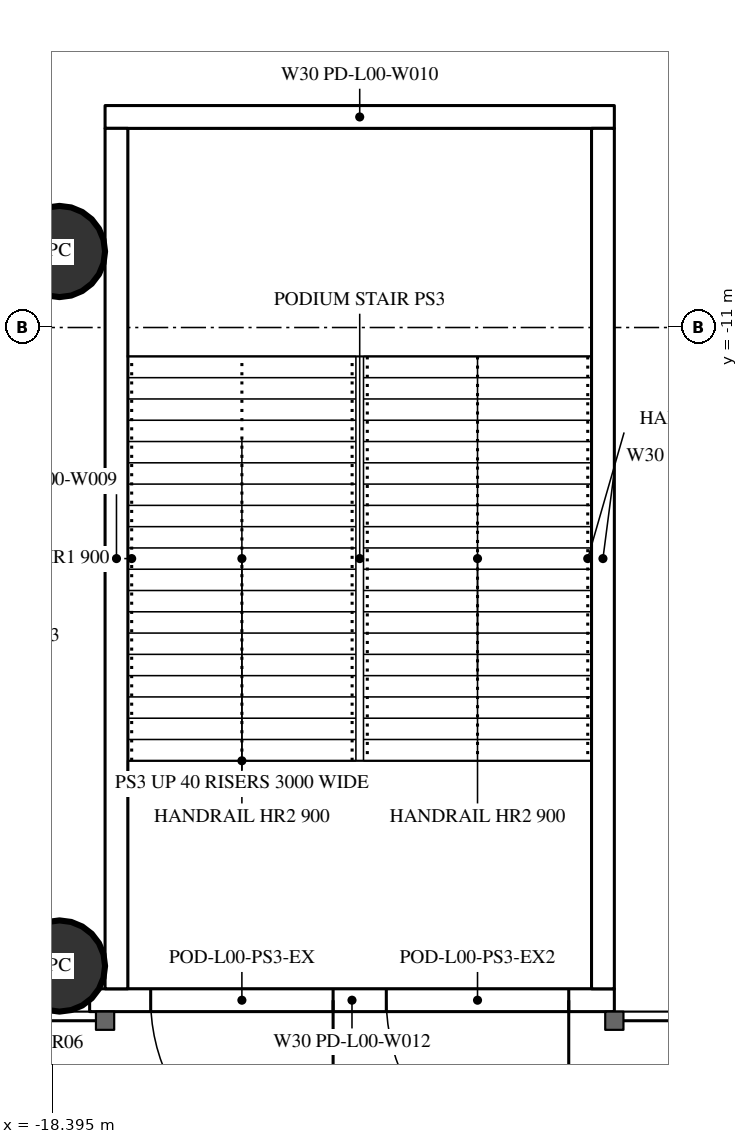
"""IFC4 building model, lengths in metres.
Left out: names, types, materials, properties, quantities, classifications, styles, units other than length and angle.
Written with IfcOpenShell. Run it as: python <this file> out.ifc"""

import sys

from ifc_helpers import new_model, si_unit, direction, frame, frame_2d, origin, origin_2d, place, context, subcontext, project, spatial, rectangle, circle, extrude, element, fill, save


model = new_model("IFC4")
c1 = context("Model", 3, precision=1e-05, world=origin(), true_north=direction((0.0, 1.0)))
c2 = subcontext(c1, "Body", "Model", "MODEL_VIEW")
j1 = project(units=[si_unit("LENGTHUNIT", "METRE"), si_unit("PLANEANGLEUNIT", "RADIAN")], contexts=[c1])
p1 = place(None, origin())
s1 = spatial("IfcSite", under=j1, at=p1, CompositionType="ELEMENT")
p2 = place(p1, origin())
s2 = spatial("IfcBuilding", under=s1, at=p2, CompositionType="ELEMENT")
p3 = place(p2, origin())
s3 = spatial("IfcBuildingStorey", under=s2, at=p3, CompositionType="ELEMENT", Elevation=0.0)
for number, where, z_axis, x_axis in (
    (1, (-18.3, -19.4, 0.0), (0.0, 0.0, 1.0), (1.0, 0.0, 0.0)),
    (2, (-18.3, -10.0, 0.0), (0.0, 0.0, 1.0), (1.0, 0.0, 0.0)),
):
    element("IfcColumn", number, at=place(p3, frame(where, z_axis=z_axis, x_axis=x_axis)), inside=s3, PredefinedType="COLUMN", context=c2, shape_type="SweptSolid", body=[
        extrude(circle(Radius=0.6, at=origin_2d()), origin(), (0.0, 0.0, 1.0), 7.2),
    ])
p4 = place(p3, frame((-11.0, -19.85, 0.0), z_axis=(0.0, 0.0, 1.0), x_axis=(-1.0, 0.0, 0.0)))
e3 = element("IfcWall", 3, at=p4, inside=s3, PredefinedType="SOLIDWALL", context=c2, shape_type="SweptSolid", body=[
    extrude(rectangle(XDim=6.903, YDim=0.3, at=frame_2d((3.452, 0.0))), origin(), (0.0, 0.0, 1.0), 5.95),
])
p5 = place(p4, frame((3.7, 0.0, 0.0)))
e4 = element("IfcOpeningElement", 4, at=p5, cuts=e3, PredefinedType="OPENING", context=c2, shape_type="SweptSolid", body=[
    extrude(rectangle(XDim=2.4, YDim=2.2, at=frame_2d((1.2, 1.1))), frame((0.0, 0.16, 0.0), z_axis=(0.0, -1.0, 0.0), x_axis=(1.0, 0.0, 0.0)), (0.0, 0.0, 1.0), 0.32),
])
p6 = place(p4, frame((0.6, 0.0, 0.0)))
e5 = element("IfcOpeningElement", 5, at=p6, cuts=e3, PredefinedType="OPENING", context=c2, shape_type="SweptSolid", body=[
    extrude(rectangle(XDim=2.4, YDim=2.2, at=frame_2d((1.2, 1.1))), frame((0.0, 0.16, 0.0), z_axis=(0.0, -1.0, 0.0), x_axis=(1.0, 0.0, 0.0)), (0.0, 0.0, 1.0), 0.32),
])
p7 = place(p3, frame((-17.7, -8.23, 0.0), z_axis=(0.0, 0.0, 1.0), x_axis=(1.0, 0.0, 0.0)))
e6 = element("IfcWall", 6, at=p7, inside=s3, PredefinedType="SOLIDWALL", context=c2, shape_type="SweptSolid", body=[
    extrude(rectangle(XDim=6.7, YDim=0.3, at=frame_2d((3.35, 0.0))), origin(), (0.0, 0.0, 1.0), 6.85),
])
for number, where, z_axis, x_axis in (
    (7, (-11.15, -8.38, 0.0), (0.0, 0.0, 1.0), (0.0, -1.0, 0.0)),
    (8, (-17.55, -8.38, 0.0), (0.0, 0.0, 1.0), (0.0, -1.0, 0.0)),
):
    element("IfcWall", number, at=place(p3, frame(where, z_axis=z_axis, x_axis=x_axis)), inside=s3, PredefinedType="SOLIDWALL", context=c2, shape_type="SweptSolid", body=[
        extrude(rectangle(XDim=11.32, YDim=0.3, at=frame_2d((5.66, 0.0))), origin(), (0.0, 0.0, 1.0), 6.85),
    ])
p8 = place(p5, origin())
e9 = element("IfcDoor", 9, at=p8, inside=s3, OperationType="DOUBLE_DOOR_SINGLE_SWING", PredefinedType="DOOR", context=c2, shape_type="SweptSolid", body=[
    extrude(rectangle(XDim=2.4, YDim=2.2, at=frame_2d((1.2, 1.1))), frame((0.0, 0.025, 0.0), z_axis=(0.0, -1.0, 0.0), x_axis=(1.0, 0.0, 0.0)), (0.0, 0.0, 1.0), 0.05),
])
fill(e4, e9)
p9 = place(p6, origin())
e10 = element("IfcDoor", 10, at=p9, inside=s3, OperationType="DOUBLE_DOOR_SINGLE_SWING", PredefinedType="DOOR", context=c2, shape_type="SweptSolid", body=[
    extrude(rectangle(XDim=2.4, YDim=2.2, at=frame_2d((1.2, 1.1))), frame((0.0, 0.025, 0.0), z_axis=(0.0, -1.0, 0.0), x_axis=(1.0, 0.0, 0.0)), (0.0, 0.0, 1.0), 0.05),
])
fill(e5, e10)
save(model, sys.argv[1])
